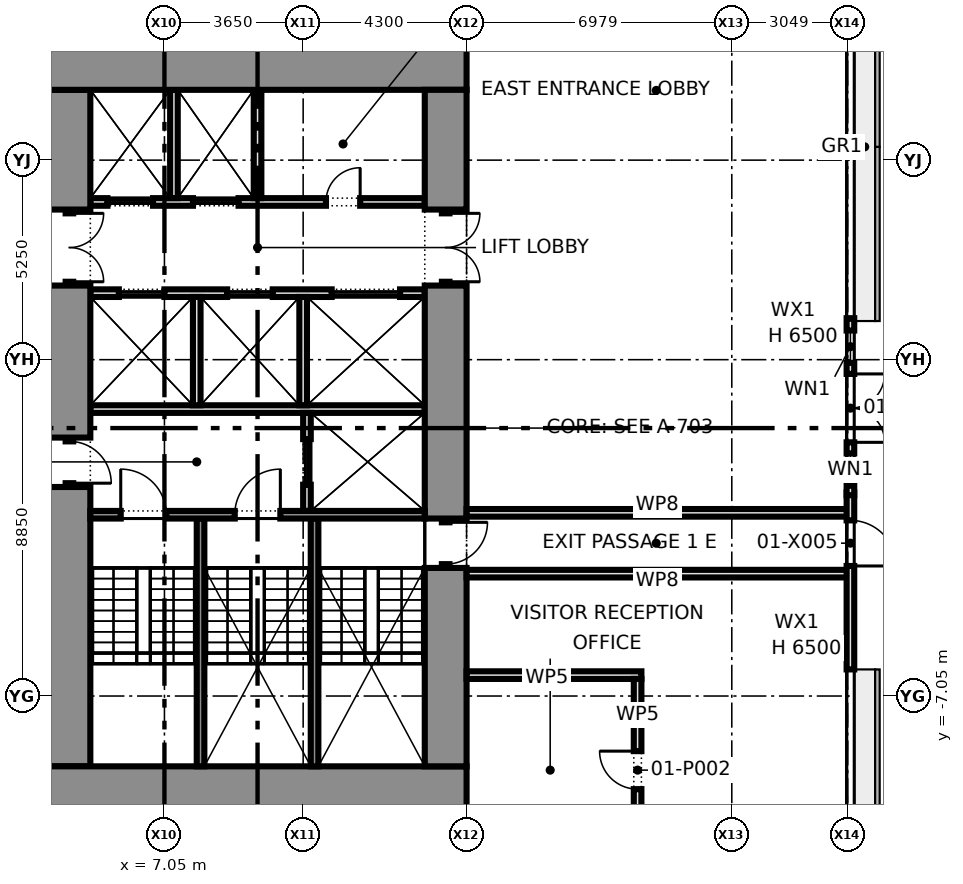
"""IFC4 building model, lengths in metres.
Left out: names, types, materials, properties, quantities, classifications, styles, units other than length and angle.
Written with IfcOpenShell. Run it as: python <this file> out.ifc"""

import sys

from ifc_helpers import new_model, si_unit, direction, frame, frame_2d, origin, place, context, subcontext, project, spatial, rectangle, extrude, element, fill, save


model = new_model("IFC4")
c1 = context("Model", 3, precision=1e-05, world=origin(), true_north=direction((0.0, 1.0)))
c2 = subcontext(c1, "Body", "Model", "MODEL_VIEW")
j1 = project(units=[si_unit("LENGTHUNIT", "METRE"), si_unit("PLANEANGLEUNIT", "RADIAN")], contexts=[c1])
p1 = place(None, origin())
s1 = spatial("IfcSite", under=j1, at=p1, CompositionType="ELEMENT")
p2 = place(p1, origin())
s2 = spatial("IfcBuilding", under=s1, at=p2, CompositionType="ELEMENT")
p3 = place(p2, origin())
s3 = spatial("IfcBuildingStorey", under=s2, at=p3, CompositionType="ELEMENT", Elevation=0.0)
p4 = place(p3, frame((25.1, -6.35, 0.0), z_axis=(0.0, 0.0, 1.0), x_axis=(0.0, 1.0, 0.0)))
e1 = element("IfcWall", 1, at=p4, inside=s3, PredefinedType="STANDARD", context=c2, shape_type="SweptSolid", body=[
    extrude(rectangle(XDim=4.658, YDim=0.2, at=frame_2d((2.329, 0.0))), origin(), (0.0, 0.0, 1.0), 6.5),
])
p5 = place(p4, frame((2.722, 0.0, 0.0)))
e2 = element("IfcOpeningElement", 2, at=p5, cuts=e1, PredefinedType="OPENING", context=c2, shape_type="SweptSolid", body=[
    extrude(rectangle(XDim=1.2, YDim=2.1, at=frame_2d((0.6, 1.05))), frame((0.0, 0.11, 0.0), z_axis=(0.0, -1.0, 0.0), x_axis=(1.0, 0.0, 0.0)), (0.0, 0.0, 1.0), 0.22),
])
p6 = place(p3, frame((25.1, -1.767, 0.0), z_axis=(0.0, 0.0, 1.0), x_axis=(0.0, 1.0, 0.0)))
e3 = element("IfcWall", 3, at=p6, inside=s3, PredefinedType="STANDARD", context=c2, shape_type="SweptSolid", body=[
    extrude(rectangle(XDim=4.658, YDim=0.2, at=frame_2d((2.329, 0.0))), origin(), (0.0, 0.0, 1.0), 6.5),
])
p7 = place(p6, frame((1.392, 0.0, 0.0)))
e4 = element("IfcOpeningElement", 4, at=p7, cuts=e3, PredefinedType="OPENING", context=c2, shape_type="SweptSolid", body=[
    extrude(rectangle(XDim=1.8, YDim=2.4, at=frame_2d((0.9, 1.2))), frame((0.0, 0.11, 0.0), z_axis=(0.0, -1.0, 0.0), x_axis=(1.0, 0.0, 0.0)), (0.0, 0.0, 1.0), 0.22),
])
p8 = place(p6, frame((0.25, 0.0, 0.0)))
e5 = element("IfcOpeningElement", 5, at=p8, cuts=e3, PredefinedType="OPENING", context=c2, shape_type="SweptSolid", body=[
    extrude(rectangle(XDim=0.85, YDim=2.4, at=frame_2d((0.425, 1.2))), frame((0.0, 0.11, 0.0), z_axis=(0.0, -1.0, 0.0), x_axis=(1.0, 0.0, 0.0)), (0.0, 0.0, 1.0), 0.22),
])
p9 = place(p6, frame((3.483, 0.0, 0.0)))
e6 = element("IfcOpeningElement", 6, at=p9, cuts=e3, PredefinedType="OPENING", context=c2, shape_type="SweptSolid", body=[
    extrude(rectangle(XDim=0.85, YDim=2.4, at=frame_2d((0.425, 1.2))), frame((0.0, 0.11, 0.0), z_axis=(0.0, -1.0, 0.0), x_axis=(1.0, 0.0, 0.0)), (0.0, 0.0, 1.0), 0.22),
])
for number, where, z_axis, x_axis in (
    (7, (15.0, 9.45, 0.0), (0.0, 0.0, 1.0), (-1.0, 0.0, 0.0)),
    (8, (15.0, -9.45, 0.0), (0.0, 0.0, 1.0), (-1.0, 0.0, 0.0)),
):
    element("IfcWall", number, at=place(p3, frame(where, z_axis=z_axis, x_axis=x_axis)), inside=s3, PredefinedType="SHEAR", context=c2, shape_type="SweptSolid", body=[
        extrude(rectangle(XDim=11.0, YDim=1.1, at=frame_2d((5.5, 0.0))), origin(), (0.0, 0.0, 1.0), 6.275),
    ])
p10 = place(p3, frame((14.45, 8.9, 0.0), z_axis=(0.0, 0.0, 1.0), x_axis=(0.0, -1.0, 0.0)))
e9 = element("IfcWall", 9, at=p10, inside=s3, PredefinedType="SHEAR", context=c2, shape_type="SweptSolid", body=[
    extrude(rectangle(XDim=3.15, YDim=1.1, at=frame_2d((1.575, 0.0))), origin(), (0.0, 0.0, 1.0), 6.275),
])
p11 = place(p3, frame((14.45, 5.75, 0.0), z_axis=(0.0, 0.0, 1.0), x_axis=(0.0, -1.0, 0.0)))
e10 = element("IfcWall", 10, at=p11, inside=s3, PredefinedType="PARTITIONING", context=c2, shape_type="SweptSolid", body=[
    extrude(rectangle(XDim=2.0, YDim=0.2, at=frame_2d((1.0, 0.0))), origin(), (0.0, 0.0, 1.0), 2.4),
])
p12 = place(p11, frame((0.1, 0.0, 0.0)))
e11 = element("IfcOpeningElement", 11, at=p12, cuts=e10, PredefinedType="OPENING", context=c2, shape_type="SweptSolid", body=[
    extrude(rectangle(XDim=1.8, YDim=2.1, at=frame_2d((0.9, 1.05))), frame((0.0, 0.11, 0.0), z_axis=(0.0, -1.0, 0.0), x_axis=(1.0, 0.0, 0.0)), (0.0, 0.0, 1.0), 0.22),
])
p13 = place(p3, frame((14.45, 3.75, 0.0), z_axis=(0.0, 0.0, 1.0), x_axis=(0.0, -1.0, 0.0)))
e12 = element("IfcWall", 12, at=p13, inside=s3, PredefinedType="SHEAR", context=c2, shape_type="SweptSolid", body=[
    extrude(rectangle(XDim=6.13, YDim=1.1, at=frame_2d((3.065, 0.0))), origin(), (0.0, 0.0, 1.0), 6.275),
])
p14 = place(p3, frame((14.45, -2.38, 0.0), z_axis=(0.0, 0.0, 1.0), x_axis=(0.0, -1.0, 0.0)))
e13 = element("IfcWall", 13, at=p14, inside=s3, PredefinedType="SHEAR", context=c2, shape_type="SweptSolid", body=[
    extrude(rectangle(XDim=1.3, YDim=0.2, at=frame_2d((0.65, 0.0))), origin(), (0.0, 0.0, 1.0), 2.4),
])
p15 = place(p14, frame((0.1, 0.0, 0.0)))
e14 = element("IfcOpeningElement", 14, at=p15, cuts=e13, PredefinedType="OPENING", context=c2, shape_type="SweptSolid", body=[
    extrude(rectangle(XDim=1.1, YDim=2.1, at=frame_2d((0.55, 1.05))), frame((0.0, 0.11, 0.0), z_axis=(0.0, -1.0, 0.0), x_axis=(1.0, 0.0, 0.0)), (0.0, 0.0, 1.0), 0.22),
])
p16 = place(p3, frame((14.45, -3.68, 0.0), z_axis=(0.0, 0.0, 1.0), x_axis=(0.0, -1.0, 0.0)))
e15 = element("IfcWall", 15, at=p16, inside=s3, PredefinedType="SHEAR", context=c2, shape_type="SweptSolid", body=[
    extrude(rectangle(XDim=5.22, YDim=1.1, at=frame_2d((2.61, 0.0))), origin(), (0.0, 0.0, 1.0), 6.275),
])
p17 = place(p3, frame((4.55, 8.9, 0.0), z_axis=(0.0, 0.0, 1.0), x_axis=(0.0, -1.0, 0.0)))
e16 = element("IfcWall", 16, at=p17, inside=s3, PredefinedType="SHEAR", context=c2, shape_type="SweptSolid", body=[
    extrude(rectangle(XDim=3.15, YDim=1.1, at=frame_2d((1.575, 0.0))), origin(), (0.0, 0.0, 1.0), 6.275),
])
p18 = place(p3, frame((4.55, 5.75, 0.0), z_axis=(0.0, 0.0, 1.0), x_axis=(0.0, -1.0, 0.0)))
e17 = element("IfcWall", 17, at=p18, inside=s3, PredefinedType="PARTITIONING", context=c2, shape_type="SweptSolid", body=[
    extrude(rectangle(XDim=2.0, YDim=0.2, at=frame_2d((1.0, 0.0))), origin(), (0.0, 0.0, 1.0), 2.4),
])
p19 = place(p18, frame((0.1, 0.0, 0.0)))
e18 = element("IfcOpeningElement", 18, at=p19, cuts=e17, PredefinedType="OPENING", context=c2, shape_type="SweptSolid", body=[
    extrude(rectangle(XDim=1.8, YDim=2.1, at=frame_2d((0.9, 1.05))), frame((0.0, 0.11, 0.0), z_axis=(0.0, -1.0, 0.0), x_axis=(1.0, 0.0, 0.0)), (0.0, 0.0, 1.0), 0.22),
])
p20 = place(p3, frame((4.55, 3.75, 0.0), z_axis=(0.0, 0.0, 1.0), x_axis=(0.0, -1.0, 0.0)))
e19 = element("IfcWall", 19, at=p20, inside=s3, PredefinedType="SHEAR", context=c2, shape_type="SweptSolid", body=[
    extrude(rectangle(XDim=4.0, YDim=1.1, at=frame_2d((2.0, 0.0))), origin(), (0.0, 0.0, 1.0), 6.275),
])
p21 = place(p3, frame((4.55, -0.25, 0.0), z_axis=(0.0, 0.0, 1.0), x_axis=(0.0, -1.0, 0.0)))
e20 = element("IfcWall", 20, at=p21, inside=s3, PredefinedType="PARTITIONING", context=c2, shape_type="SweptSolid", body=[
    extrude(rectangle(XDim=1.3, YDim=0.2, at=frame_2d((0.65, 0.0))), origin(), (0.0, 0.0, 1.0), 2.4),
])
p22 = place(p21, frame((0.1, 0.0, 0.0)))
e21 = element("IfcOpeningElement", 21, at=p22, cuts=e20, PredefinedType="OPENING", context=c2, shape_type="SweptSolid", body=[
    extrude(rectangle(XDim=1.1, YDim=2.1, at=frame_2d((0.55, 1.05))), frame((0.0, 0.11, 0.0), z_axis=(0.0, -1.0, 0.0), x_axis=(1.0, 0.0, 0.0)), (0.0, 0.0, 1.0), 0.22),
])
p23 = place(p3, frame((4.55, -1.55, 0.0), z_axis=(0.0, 0.0, 1.0), x_axis=(0.0, -1.0, 0.0)))
e22 = element("IfcWall", 22, at=p23, inside=s3, PredefinedType="SHEAR", context=c2, shape_type="SweptSolid", body=[
    extrude(rectangle(XDim=7.35, YDim=1.1, at=frame_2d((3.675, 0.0))), origin(), (0.0, 0.0, 1.0), 6.275),
])
p24 = place(p3, frame((13.9, 5.95, 0.0), z_axis=(0.0, 0.0, 1.0), x_axis=(-1.0, 0.0, 0.0)))
e23 = element("IfcWall", 23, at=p24, inside=s3, PredefinedType="PARTITIONING", context=c2, shape_type="SweptSolid", body=[
    extrude(rectangle(XDim=8.8, YDim=0.2, at=frame_2d((4.4, 0.0))), origin(), (0.0, 0.0, 1.0), 6.275),
])
p25 = place(p24, frame((4.9, 0.0, 0.0)))
e24 = element("IfcOpeningElement", 24, at=p25, cuts=e23, PredefinedType="OPENING", context=c2, shape_type="SweptSolid", body=[
    extrude(rectangle(XDim=1.2, YDim=2.1, at=frame_2d((0.6, 1.05))), frame((0.0, 0.11, 0.0), z_axis=(0.0, -1.0, 0.0), x_axis=(1.0, 0.0, 0.0)), (0.0, 0.0, 1.0), 0.22),
])
p26 = place(p24, frame((7.15, 0.0, 0.0)))
e25 = element("IfcOpeningElement", 25, at=p26, cuts=e23, PredefinedType="OPENING", context=c2, shape_type="SweptSolid", body=[
    extrude(rectangle(XDim=1.2, YDim=2.1, at=frame_2d((0.6, 1.05))), frame((0.0, 0.11, 0.0), z_axis=(0.0, -1.0, 0.0), x_axis=(1.0, 0.0, 0.0)), (0.0, 0.0, 1.0), 0.22),
])
p27 = place(p24, frame((1.7, 0.0, 0.0)))
e26 = element("IfcOpeningElement", 26, at=p27, cuts=e23, PredefinedType="OPENING", context=c2, shape_type="SweptSolid", body=[
    extrude(rectangle(XDim=0.9, YDim=2.1, at=frame_2d((0.45, 1.05))), frame((0.0, 0.11, 0.0), z_axis=(0.0, -1.0, 0.0), x_axis=(1.0, 0.0, 0.0)), (0.0, 0.0, 1.0), 0.22),
])
p28 = place(p3, frame((13.9, 3.55, 0.0), z_axis=(0.0, 0.0, 1.0), x_axis=(-1.0, 0.0, 0.0)))
e27 = element("IfcWall", 27, at=p28, inside=s3, PredefinedType="PARTITIONING", context=c2, shape_type="SweptSolid", body=[
    extrude(rectangle(XDim=8.8, YDim=0.2, at=frame_2d((4.4, 0.0))), origin(), (0.0, 0.0, 1.0), 6.275),
])
p29 = place(p28, frame((0.65, 0.0, 0.0)))
e28 = element("IfcOpeningElement", 28, at=p29, cuts=e27, PredefinedType="OPENING", context=c2, shape_type="SweptSolid", body=[
    extrude(rectangle(XDim=1.8, YDim=2.1, at=frame_2d((0.9, 1.05))), frame((0.0, 0.11, 0.0), z_axis=(0.0, -1.0, 0.0), x_axis=(1.0, 0.0, 0.0)), (0.0, 0.0, 1.0), 0.22),
])
p30 = place(p28, frame((4.0, 0.0, 0.0)))
e29 = element("IfcOpeningElement", 29, at=p30, cuts=e27, PredefinedType="OPENING", context=c2, shape_type="SweptSolid", body=[
    extrude(rectangle(XDim=1.2, YDim=2.1, at=frame_2d((0.6, 1.05))), frame((0.0, 0.11, 0.0), z_axis=(0.0, -1.0, 0.0), x_axis=(1.0, 0.0, 0.0)), (0.0, 0.0, 1.0), 0.22),
])
p31 = place(p28, frame((6.85, 0.0, 0.0)))
e30 = element("IfcOpeningElement", 30, at=p31, cuts=e27, PredefinedType="OPENING", context=c2, shape_type="SweptSolid", body=[
    extrude(rectangle(XDim=1.2, YDim=2.1, at=frame_2d((0.6, 1.05))), frame((0.0, 0.11, 0.0), z_axis=(0.0, -1.0, 0.0), x_axis=(1.0, 0.0, 0.0)), (0.0, 0.0, 1.0), 0.22),
])
p32 = place(p3, frame((13.9, 0.5, 0.0), z_axis=(0.0, 0.0, 1.0), x_axis=(-1.0, 0.0, 0.0)))
e31 = element("IfcWall", 31, at=p32, inside=s3, PredefinedType="PARTITIONING", context=c2, shape_type="SweptSolid", body=[
    extrude(rectangle(XDim=8.8, YDim=0.2, at=frame_2d((4.4, 0.0))), origin(), (0.0, 0.0, 1.0), 6.275),
])
p33 = place(p3, frame((10.8, 0.4, 0.0), z_axis=(0.0, 0.0, 1.0), x_axis=(0.0, -1.0, 0.0)))
e32 = element("IfcWall", 32, at=p33, inside=s3, PredefinedType="PARTITIONING", context=c2, shape_type="SweptSolid", body=[
    extrude(rectangle(XDim=2.58, YDim=0.2, at=frame_2d((1.29, 0.0))), origin(), (0.0, 0.0, 1.0), 6.275),
])
p34 = place(p33, frame((0.69, 0.0, 0.0)))
e33 = element("IfcOpeningElement", 33, at=p34, cuts=e32, PredefinedType="OPENING", context=c2, shape_type="SweptSolid", body=[
    extrude(rectangle(XDim=1.2, YDim=2.1, at=frame_2d((0.6, 1.05))), frame((0.0, 0.11, 0.0), z_axis=(0.0, -1.0, 0.0), x_axis=(1.0, 0.0, 0.0)), (0.0, 0.0, 1.0), 0.22),
])
p35 = place(p3, frame((13.9, -2.28, 0.0), z_axis=(0.0, 0.0, 1.0), x_axis=(-1.0, 0.0, 0.0)))
e34 = element("IfcWall", 34, at=p35, inside=s3, PredefinedType="SHEAR", context=c2, shape_type="SweptSolid", body=[
    extrude(rectangle(XDim=8.8, YDim=0.2, at=frame_2d((4.4, 0.0))), origin(), (0.0, 0.0, 1.0), 6.275),
])
p36 = place(p35, frame((3.8, 0.0, 0.0)))
e35 = element("IfcOpeningElement", 35, at=p36, cuts=e34, PredefinedType="OPENING", context=c2, shape_type="SweptSolid", body=[
    extrude(rectangle(XDim=1.2, YDim=2.1, at=frame_2d((0.6, 1.05))), frame((0.0, 0.11, 0.0), z_axis=(0.0, -1.0, 0.0), x_axis=(1.0, 0.0, 0.0)), (0.0, 0.0, 1.0), 0.22),
])
p37 = place(p35, frame((6.8, 0.0, 0.0)))
e36 = element("IfcOpeningElement", 36, at=p37, cuts=e34, PredefinedType="OPENING", context=c2, shape_type="SweptSolid", body=[
    extrude(rectangle(XDim=1.2, YDim=2.1, at=frame_2d((0.6, 1.05))), frame((0.0, 0.11, 0.0), z_axis=(0.0, -1.0, 0.0), x_axis=(1.0, 0.0, 0.0)), (0.0, 0.0, 1.0), 0.22),
])
for number, where, z_axis, x_axis in (
    (37, (11.0, -2.38, 0.0), (0.0, 0.0, 1.0), (0.0, -1.0, 0.0)),
    (38, (8.0, -2.38, 0.0), (0.0, 0.0, 1.0), (0.0, -1.0, 0.0)),
):
    element("IfcWall", number, at=place(p3, frame(where, z_axis=z_axis, x_axis=x_axis)), inside=s3, PredefinedType="SHEAR", context=c2, shape_type="SweptSolid", body=[
        extrude(rectangle(XDim=6.52, YDim=0.2, at=frame_2d((3.26, 0.0))), origin(), (0.0, 0.0, 1.0), 6.275),
    ])
for number, where, z_axis, x_axis in (
    (39, (9.5, 8.9, 0.0), (0.0, 0.0, 1.0), (0.0, -1.0, 0.0)),
    (40, (7.3, 8.9, 0.0), (0.0, 0.0, 1.0), (0.0, -1.0, 0.0)),
    (41, (10.7, 3.45, 0.0), (0.0, 0.0, 1.0), (0.0, -1.0, 0.0)),
    (42, (7.9, 3.45, 0.0), (0.0, 0.0, 1.0), (0.0, -1.0, 0.0)),
):
    element("IfcWall", number, at=place(p3, frame(where, z_axis=z_axis, x_axis=x_axis)), inside=s3, PredefinedType="PARTITIONING", context=c2, shape_type="SweptSolid", body=[
        extrude(rectangle(XDim=2.85, YDim=0.2, at=frame_2d((1.425, 0.0))), origin(), (0.0, 0.0, 1.0), 6.275),
    ])
p38 = place(p3, frame((15.0, -6.5, 0.0), z_axis=(0.0, 0.0, 1.0), x_axis=(1.0, 0.0, 0.0)))
e43 = element("IfcWall", 43, at=p38, inside=s3, PredefinedType="PARTITIONING", context=c2, shape_type="SweptSolid", body=[
    extrude(rectangle(XDim=4.6, YDim=0.2, at=frame_2d((2.3, 0.0))), origin(), (0.0, 0.0, 1.0), 6.275),
])
p39 = place(p3, frame((19.5, -11.4, 0.0), z_axis=(0.0, 0.0, 1.0), x_axis=(0.0, 1.0, 0.0)))
e44 = element("IfcWall", 44, at=p39, inside=s3, PredefinedType="PARTITIONING", context=c2, shape_type="SweptSolid", body=[
    extrude(rectangle(XDim=4.8, YDim=0.2, at=frame_2d((2.4, 0.0))), origin(), (0.0, 0.0, 1.0), 6.275),
])
p40 = place(p39, frame((1.9, 0.0, 0.0)))
e45 = element("IfcOpeningElement", 45, at=p40, cuts=e44, PredefinedType="OPENING", context=c2, shape_type="SweptSolid", body=[
    extrude(rectangle(XDim=1.0, YDim=2.1, at=frame_2d((0.5, 1.05))), frame((0.0, 0.11, 0.0), z_axis=(0.0, -1.0, 0.0), x_axis=(1.0, 0.0, 0.0)), (0.0, 0.0, 1.0), 0.22),
])
for number, where, z_axis, x_axis in (
    (46, (15.0, -3.83, 0.0), (0.0, 0.0, 1.0), (1.0, 0.0, 0.0)),
    (47, (15.0, -2.23, 0.0), (0.0, 0.0, 1.0), (1.0, 0.0, 0.0)),
):
    element("IfcWall", number, at=place(p3, frame(where, z_axis=z_axis, x_axis=x_axis)), inside=s3, PredefinedType="PARTITIONING", context=c2, shape_type="SweptSolid", body=[
        extrude(rectangle(XDim=10.03, YDim=0.2, at=frame_2d((5.015, 0.0))), origin(), (0.0, 0.0, 1.0), 6.275),
    ])
p41 = place(p5, frame((1.2, 0.0, 0.0), z_axis=(0.0, 0.0, 1.0), x_axis=(-1.0, 0.0, 0.0)))
e48 = element("IfcDoor", 48, at=p41, inside=s3, OperationType="SINGLE_SWING_RIGHT", PredefinedType="DOOR", context=c2, shape_type="SweptSolid", body=[
    extrude(rectangle(XDim=1.2, YDim=2.1, at=frame_2d((0.6, 1.05))), frame((0.0, 0.025, 0.0), z_axis=(0.0, -1.0, 0.0), x_axis=(1.0, 0.0, 0.0)), (0.0, 0.0, 1.0), 0.05),
])
fill(e2, e48)
p42 = place(p7, frame((1.8, 0.0, 0.0), z_axis=(0.0, 0.0, 1.0), x_axis=(-1.0, 0.0, 0.0)))
e49 = element("IfcDoor", 49, at=p42, inside=s3, OperationType="DOUBLE_DOOR_DOUBLE_SWING", PredefinedType="DOOR", context=c2, shape_type="SweptSolid", body=[
    extrude(rectangle(XDim=1.8, YDim=2.4, at=frame_2d((0.9, 1.2))), frame((0.0, 0.025, 0.0), z_axis=(0.0, -1.0, 0.0), x_axis=(1.0, 0.0, 0.0)), (0.0, 0.0, 1.0), 0.05),
])
fill(e4, e49)
p43 = place(p8, origin())
e50 = element("IfcWindow", 50, at=p43, inside=s3, PartitioningType="SINGLE_PANEL", PredefinedType="WINDOW", context=c2, shape_type="SweptSolid", body=[
    extrude(rectangle(XDim=0.85, YDim=2.4, at=frame_2d((0.425, 1.2))), frame((0.0, 0.03, 0.0), z_axis=(0.0, -1.0, 0.0), x_axis=(1.0, 0.0, 0.0)), (0.0, 0.0, 1.0), 0.06),
])
fill(e5, e50)
p44 = place(p9, origin())
e51 = element("IfcWindow", 51, at=p44, inside=s3, PartitioningType="SINGLE_PANEL", PredefinedType="WINDOW", context=c2, shape_type="SweptSolid", body=[
    extrude(rectangle(XDim=0.85, YDim=2.4, at=frame_2d((0.425, 1.2))), frame((0.0, 0.03, 0.0), z_axis=(0.0, -1.0, 0.0), x_axis=(1.0, 0.0, 0.0)), (0.0, 0.0, 1.0), 0.06),
])
fill(e6, e51)
p45 = place(p12, origin())
e52 = element("IfcDoor", 52, at=p45, inside=s3, OperationType="DOUBLE_DOOR_SINGLE_SWING", PredefinedType="DOOR", context=c2, shape_type="SweptSolid", body=[
    extrude(rectangle(XDim=1.8, YDim=2.1, at=frame_2d((0.9, 1.05))), frame((0.0, 0.025, 0.0), z_axis=(0.0, -1.0, 0.0), x_axis=(1.0, 0.0, 0.0)), (0.0, 0.0, 1.0), 0.05),
])
fill(e11, e52)
p46 = place(p15, origin())
e53 = element("IfcDoor", 53, at=p46, inside=s3, OperationType="SINGLE_SWING_LEFT", PredefinedType="DOOR", context=c2, shape_type="SweptSolid", body=[
    extrude(rectangle(XDim=1.1, YDim=2.1, at=frame_2d((0.55, 1.05))), frame((0.0, 0.025, 0.0), z_axis=(0.0, -1.0, 0.0), x_axis=(1.0, 0.0, 0.0)), (0.0, 0.0, 1.0), 0.05),
])
fill(e14, e53)
p47 = place(p19, origin())
e54 = element("IfcDoor", 54, at=p47, inside=s3, OperationType="DOUBLE_DOOR_SINGLE_SWING", PredefinedType="DOOR", context=c2, shape_type="SweptSolid", body=[
    extrude(rectangle(XDim=1.8, YDim=2.1, at=frame_2d((0.9, 1.05))), frame((0.0, 0.025, 0.0), z_axis=(0.0, -1.0, 0.0), x_axis=(1.0, 0.0, 0.0)), (0.0, 0.0, 1.0), 0.05),
])
fill(e18, e54)
p48 = place(p22, origin())
e55 = element("IfcDoor", 55, at=p48, inside=s3, OperationType="SINGLE_SWING_RIGHT", PredefinedType="DOOR", context=c2, shape_type="SweptSolid", body=[
    extrude(rectangle(XDim=1.1, YDim=2.1, at=frame_2d((0.55, 1.05))), frame((0.0, 0.025, 0.0), z_axis=(0.0, -1.0, 0.0), x_axis=(1.0, 0.0, 0.0)), (0.0, 0.0, 1.0), 0.05),
])
fill(e21, e55)
p49 = place(p25, origin())
e56 = element("IfcDoor", 56, at=p49, inside=s3, OperationType="DOUBLE_DOOR_SLIDING", PredefinedType="DOOR", context=c2, shape_type="SweptSolid", body=[
    extrude(rectangle(XDim=1.2, YDim=2.1, at=frame_2d((0.6, 1.05))), frame((0.0, 0.025, 0.0), z_axis=(0.0, -1.0, 0.0), x_axis=(1.0, 0.0, 0.0)), (0.0, 0.0, 1.0), 0.05),
])
fill(e24, e56)
p50 = place(p26, origin())
e57 = element("IfcDoor", 57, at=p50, inside=s3, OperationType="DOUBLE_DOOR_SLIDING", PredefinedType="DOOR", context=c2, shape_type="SweptSolid", body=[
    extrude(rectangle(XDim=1.2, YDim=2.1, at=frame_2d((0.6, 1.05))), frame((0.0, 0.025, 0.0), z_axis=(0.0, -1.0, 0.0), x_axis=(1.0, 0.0, 0.0)), (0.0, 0.0, 1.0), 0.05),
])
fill(e25, e57)
p51 = place(p29, origin())
e58 = element("IfcDoor", 58, at=p51, inside=s3, OperationType="DOUBLE_DOOR_SLIDING", PredefinedType="DOOR", context=c2, shape_type="SweptSolid", body=[
    extrude(rectangle(XDim=1.8, YDim=2.1, at=frame_2d((0.9, 1.05))), frame((0.0, 0.025, 0.0), z_axis=(0.0, -1.0, 0.0), x_axis=(1.0, 0.0, 0.0)), (0.0, 0.0, 1.0), 0.05),
])
fill(e28, e58)
p52 = place(p30, origin())
e59 = element("IfcDoor", 59, at=p52, inside=s3, OperationType="DOUBLE_DOOR_SLIDING", PredefinedType="DOOR", context=c2, shape_type="SweptSolid", body=[
    extrude(rectangle(XDim=1.2, YDim=2.1, at=frame_2d((0.6, 1.05))), frame((0.0, 0.025, 0.0), z_axis=(0.0, -1.0, 0.0), x_axis=(1.0, 0.0, 0.0)), (0.0, 0.0, 1.0), 0.05),
])
fill(e29, e59)
p53 = place(p31, origin())
e60 = element("IfcDoor", 60, at=p53, inside=s3, OperationType="DOUBLE_DOOR_SLIDING", PredefinedType="DOOR", context=c2, shape_type="SweptSolid", body=[
    extrude(rectangle(XDim=1.2, YDim=2.1, at=frame_2d((0.6, 1.05))), frame((0.0, 0.025, 0.0), z_axis=(0.0, -1.0, 0.0), x_axis=(1.0, 0.0, 0.0)), (0.0, 0.0, 1.0), 0.05),
])
fill(e30, e60)
p54 = place(p34, origin())
e61 = element("IfcDoor", 61, at=p54, inside=s3, OperationType="DOUBLE_DOOR_SLIDING", PredefinedType="DOOR", context=c2, shape_type="SweptSolid", body=[
    extrude(rectangle(XDim=1.2, YDim=2.1, at=frame_2d((0.6, 1.05))), frame((0.0, 0.025, 0.0), z_axis=(0.0, -1.0, 0.0), x_axis=(1.0, 0.0, 0.0)), (0.0, 0.0, 1.0), 0.05),
])
fill(e33, e61)
p55 = place(p27, frame((0.9, 0.0, 0.0), z_axis=(0.0, 0.0, 1.0), x_axis=(-1.0, 0.0, 0.0)))
e62 = element("IfcDoor", 62, at=p55, inside=s3, OperationType="SINGLE_SWING_RIGHT", PredefinedType="DOOR", context=c2, shape_type="SweptSolid", body=[
    extrude(rectangle(XDim=0.9, YDim=2.1, at=frame_2d((0.45, 1.05))), frame((0.0, 0.025, 0.0), z_axis=(0.0, -1.0, 0.0), x_axis=(1.0, 0.0, 0.0)), (0.0, 0.0, 1.0), 0.05),
])
fill(e26, e62)
p56 = place(p36, frame((1.2, 0.0, 0.0), z_axis=(0.0, 0.0, 1.0), x_axis=(-1.0, 0.0, 0.0)))
e63 = element("IfcDoor", 63, at=p56, inside=s3, OperationType="SINGLE_SWING_RIGHT", PredefinedType="DOOR", context=c2, shape_type="SweptSolid", body=[
    extrude(rectangle(XDim=1.2, YDim=2.1, at=frame_2d((0.6, 1.05))), frame((0.0, 0.025, 0.0), z_axis=(0.0, -1.0, 0.0), x_axis=(1.0, 0.0, 0.0)), (0.0, 0.0, 1.0), 0.05),
])
fill(e35, e63)
p57 = place(p37, frame((1.2, 0.0, 0.0), z_axis=(0.0, 0.0, 1.0), x_axis=(-1.0, 0.0, 0.0)))
e64 = element("IfcDoor", 64, at=p57, inside=s3, OperationType="SINGLE_SWING_LEFT", PredefinedType="DOOR", context=c2, shape_type="SweptSolid", body=[
    extrude(rectangle(XDim=1.2, YDim=2.1, at=frame_2d((0.6, 1.05))), frame((0.0, 0.025, 0.0), z_axis=(0.0, -1.0, 0.0), x_axis=(1.0, 0.0, 0.0)), (0.0, 0.0, 1.0), 0.05),
])
fill(e36, e64)
p58 = place(p40, origin())
e65 = element("IfcDoor", 65, at=p58, inside=s3, OperationType="SINGLE_SWING_RIGHT", PredefinedType="DOOR", context=c2, shape_type="SweptSolid", body=[
    extrude(rectangle(XDim=1.0, YDim=2.1, at=frame_2d((0.5, 1.05))), frame((0.0, 0.025, 0.0), z_axis=(0.0, -1.0, 0.0), x_axis=(1.0, 0.0, 0.0)), (0.0, 0.0, 1.0), 0.05),
])
fill(e45, e65)
save(model, sys.argv[1])
